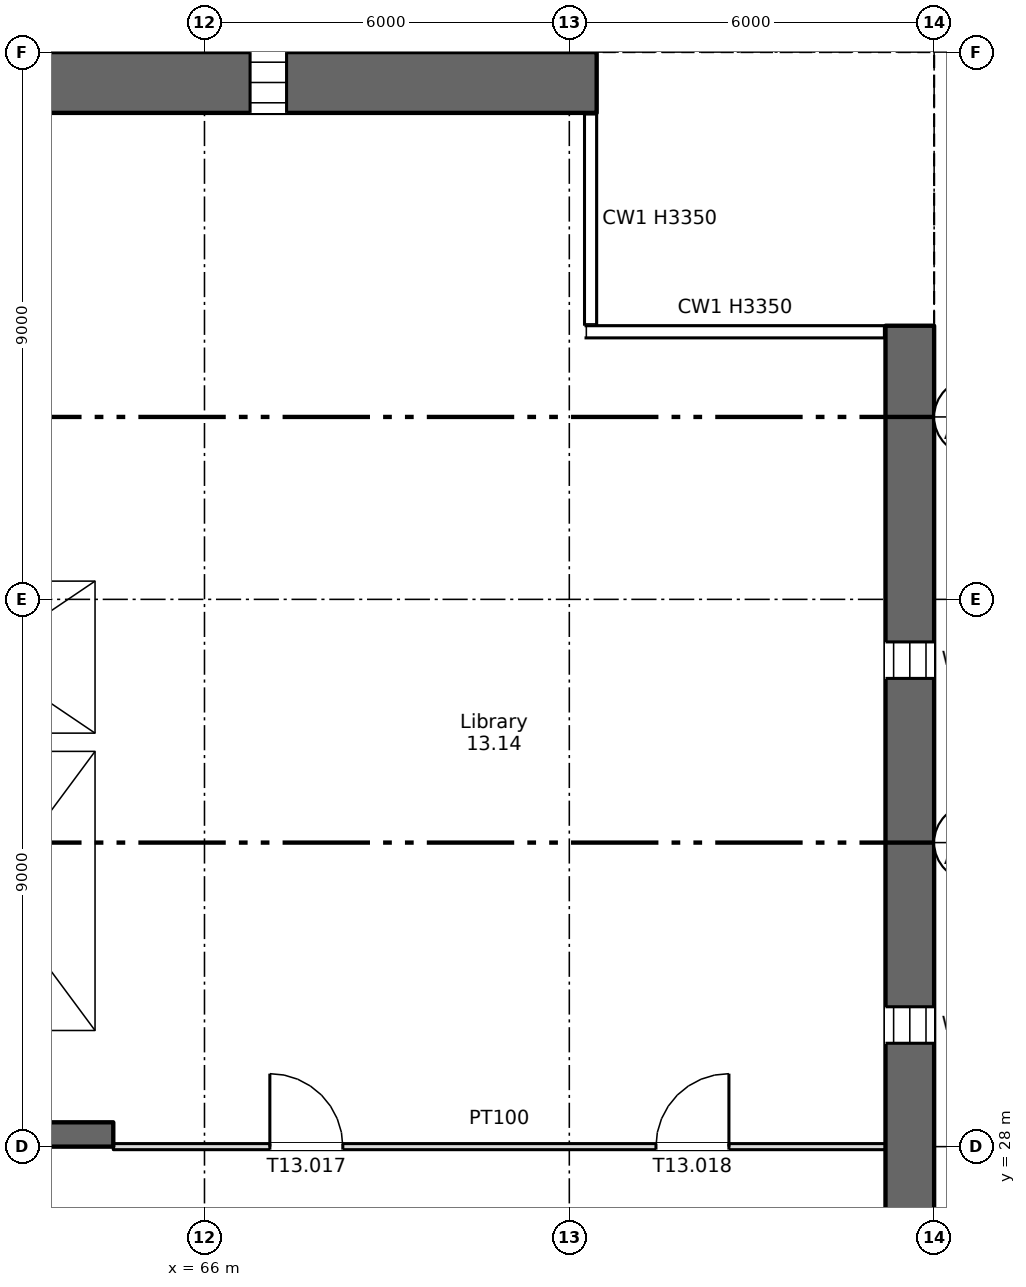
"""IFC4 building model, lengths in metres.
Left out: names, types, materials, properties, quantities, classifications, styles, units other than length and angle.
Written with IfcOpenShell. Run it as: python <this file> out.ifc"""

import sys

from ifc_helpers import new_model, si_unit, direction, frame, frame_2d, origin, place, context, subcontext, project, spatial, rectangle, extrude, element, fill, save


model = new_model("IFC4")
c1 = context("Model", 3, precision=1e-05, world=origin(), true_north=direction((0.0, 1.0)))
c2 = subcontext(c1, "Body", "Model", "MODEL_VIEW")
j1 = project(units=[si_unit("LENGTHUNIT", "METRE"), si_unit("PLANEANGLEUNIT", "RADIAN")], contexts=[c1])
p1 = place(None, origin())
s1 = spatial("IfcSite", under=j1, at=p1, CompositionType="ELEMENT")
p2 = place(p1, origin())
s2 = spatial("IfcBuilding", under=s1, at=p2, CompositionType="ELEMENT")
p3 = place(p2, frame((0.0, 0.0, 75.0)))
s3 = spatial("IfcBuildingStorey", under=s2, at=p3, CompositionType="ELEMENT", Elevation=75.0)
p4 = place(p3, frame((77.6, 4.5, 0.0), z_axis=(0.0, 0.0, 1.0), x_axis=(0.0, 1.0, 0.0)))
e1 = element("IfcWall", 1, at=p4, inside=s3, PredefinedType="SHEAR", context=c2, shape_type="SweptSolid", body=[
    extrude(rectangle(XDim=37.0, YDim=0.8, at=frame_2d((18.5, 0.0))), origin(), (0.0, 0.0, 1.0), 3.35),
])
p5 = place(p4, frame((1.2, 0.0, 0.6)))
e2 = element("IfcOpeningElement", 2, at=p5, cuts=e1, PredefinedType="OPENING", context=c2, shape_type="SweptSolid", body=[
    extrude(rectangle(XDim=0.6, YDim=2.4, at=frame_2d((0.3, 1.2))), frame((0.0, 0.41, 0.0), z_axis=(0.0, -1.0, 0.0), x_axis=(1.0, 0.0, 0.0)), (0.0, 0.0, 1.0), 0.82),
])
p6 = place(p4, frame((7.2, 0.0, 0.6)))
e3 = element("IfcOpeningElement", 3, at=p6, cuts=e1, PredefinedType="OPENING", context=c2, shape_type="SweptSolid", body=[
    extrude(rectangle(XDim=0.6, YDim=2.4, at=frame_2d((0.3, 1.2))), frame((0.0, 0.41, 0.0), z_axis=(0.0, -1.0, 0.0), x_axis=(1.0, 0.0, 0.0)), (0.0, 0.0, 1.0), 0.82),
])
p7 = place(p4, frame((13.2, 0.0, 0.6)))
e4 = element("IfcOpeningElement", 4, at=p7, cuts=e1, PredefinedType="OPENING", context=c2, shape_type="SweptSolid", body=[
    extrude(rectangle(XDim=0.6, YDim=2.4, at=frame_2d((0.3, 1.2))), frame((0.0, 0.41, 0.0), z_axis=(0.0, -1.0, 0.0), x_axis=(1.0, 0.0, 0.0)), (0.0, 0.0, 1.0), 0.82),
])
p8 = place(p4, frame((19.2, 0.0, 0.6)))
e5 = element("IfcOpeningElement", 5, at=p8, cuts=e1, PredefinedType="OPENING", context=c2, shape_type="SweptSolid", body=[
    extrude(rectangle(XDim=0.6, YDim=2.4, at=frame_2d((0.3, 1.2))), frame((0.0, 0.41, 0.0), z_axis=(0.0, -1.0, 0.0), x_axis=(1.0, 0.0, 0.0)), (0.0, 0.0, 1.0), 0.82),
])
p9 = place(p4, frame((25.2, 0.0, 0.6)))
e6 = element("IfcOpeningElement", 6, at=p9, cuts=e1, PredefinedType="OPENING", context=c2, shape_type="SweptSolid", body=[
    extrude(rectangle(XDim=0.6, YDim=2.4, at=frame_2d((0.3, 1.2))), frame((0.0, 0.41, 0.0), z_axis=(0.0, -1.0, 0.0), x_axis=(1.0, 0.0, 0.0)), (0.0, 0.0, 1.0), 0.82),
])
p10 = place(p4, frame((31.2, 0.0, 0.6)))
e7 = element("IfcOpeningElement", 7, at=p10, cuts=e1, PredefinedType="OPENING", context=c2, shape_type="SweptSolid", body=[
    extrude(rectangle(XDim=0.6, YDim=2.4, at=frame_2d((0.3, 1.2))), frame((0.0, 0.41, 0.0), z_axis=(0.0, -1.0, 0.0), x_axis=(1.0, 0.0, 0.0)), (0.0, 0.0, 1.0), 0.82),
])
p11 = place(p3, frame((5.55, 45.5, 0.0), z_axis=(0.0, 0.0, 1.0), x_axis=(1.0, 0.0, 0.0)))
e8 = element("IfcWall", 8, at=p11, inside=s3, PredefinedType="SHEAR", context=c2, shape_type="SweptSolid", body=[
    extrude(rectangle(XDim=66.9, YDim=1.0, at=frame_2d((33.45, 0.0))), origin(), (0.0, 0.0, 1.0), 3.35),
])
p12 = place(p11, frame((7.2, 0.0, 0.6)))
e9 = element("IfcOpeningElement", 9, at=p12, cuts=e8, PredefinedType="OPENING", context=c2, shape_type="SweptSolid", body=[
    extrude(rectangle(XDim=0.6, YDim=2.4, at=frame_2d((0.3, 1.2))), frame((0.0, 0.51, 0.0), z_axis=(0.0, -1.0, 0.0), x_axis=(1.0, 0.0, 0.0)), (0.0, 0.0, 1.0), 1.02),
])
p13 = place(p11, frame((61.2, 0.0, 0.6)))
e10 = element("IfcOpeningElement", 10, at=p13, cuts=e8, PredefinedType="OPENING", context=c2, shape_type="SweptSolid", body=[
    extrude(rectangle(XDim=0.6, YDim=2.4, at=frame_2d((0.3, 1.2))), frame((0.0, 0.51, 0.0), z_axis=(0.0, -1.0, 0.0), x_axis=(1.0, 0.0, 0.0)), (0.0, 0.0, 1.0), 1.02),
])
p14 = place(p3, frame((6.7, 28.2, 0.0), z_axis=(0.0, 0.0, 1.0), x_axis=(1.0, 0.0, 0.0)))
e11 = element("IfcWall", 11, at=p14, inside=s3, PredefinedType="SHEAR", context=c2, shape_type="SweptSolid", body=[
    extrude(rectangle(XDim=57.8, YDim=0.4, at=frame_2d((28.9, 0.0))), origin(), (0.0, 0.0, 1.0), 3.35),
])
p15 = place(p14, frame((12.062, 0.0, 0.0)))
e12 = element("IfcOpeningElement", 12, at=p15, cuts=e11, PredefinedType="OPENING", context=c2, shape_type="SweptSolid", body=[
    extrude(rectangle(XDim=0.9, YDim=2.1, at=frame_2d((0.45, 1.05))), frame((0.0, 0.21, 0.0), z_axis=(0.0, -1.0, 0.0), x_axis=(1.0, 0.0, 0.0)), (0.0, 0.0, 1.0), 0.42),
])
p16 = place(p14, frame((14.637, 0.0, 0.0)))
e13 = element("IfcOpeningElement", 13, at=p16, cuts=e11, PredefinedType="OPENING", context=c2, shape_type="SweptSolid", body=[
    extrude(rectangle(XDim=0.9, YDim=2.1, at=frame_2d((0.45, 1.05))), frame((0.0, 0.21, 0.0), z_axis=(0.0, -1.0, 0.0), x_axis=(1.0, 0.0, 0.0)), (0.0, 0.0, 1.0), 0.42),
])
p17 = place(p14, frame((49.062, 0.0, 0.0)))
e14 = element("IfcOpeningElement", 14, at=p17, cuts=e11, PredefinedType="OPENING", context=c2, shape_type="SweptSolid", body=[
    extrude(rectangle(XDim=0.9, YDim=2.1, at=frame_2d((0.45, 1.05))), frame((0.0, 0.21, 0.0), z_axis=(0.0, -1.0, 0.0), x_axis=(1.0, 0.0, 0.0)), (0.0, 0.0, 1.0), 0.42),
])
p18 = place(p14, frame((51.637, 0.0, 0.0)))
e15 = element("IfcOpeningElement", 15, at=p18, cuts=e11, PredefinedType="OPENING", context=c2, shape_type="SweptSolid", body=[
    extrude(rectangle(XDim=0.9, YDim=2.1, at=frame_2d((0.45, 1.05))), frame((0.0, 0.21, 0.0), z_axis=(0.0, -1.0, 0.0), x_axis=(1.0, 0.0, 0.0)), (0.0, 0.0, 1.0), 0.42),
])
p19 = place(p14, frame((1.35, 0.0, 0.0)))
e16 = element("IfcOpeningElement", 16, at=p19, cuts=e11, PredefinedType="OPENING", context=c2, shape_type="SweptSolid", body=[
    extrude(rectangle(XDim=0.9, YDim=2.1, at=frame_2d((0.45, 1.05))), frame((0.0, 0.21, 0.0), z_axis=(0.0, -1.0, 0.0), x_axis=(1.0, 0.0, 0.0)), (0.0, 0.0, 1.0), 0.42),
])
p20 = place(p14, frame((4.7, 0.0, 0.0)))
e17 = element("IfcOpeningElement", 17, at=p20, cuts=e11, PredefinedType="OPENING", context=c2, shape_type="SweptSolid", body=[
    extrude(rectangle(XDim=1.2, YDim=2.1, at=frame_2d((0.6, 1.05))), frame((0.0, 0.21, 0.0), z_axis=(0.0, -1.0, 0.0), x_axis=(1.0, 0.0, 0.0)), (0.0, 0.0, 1.0), 0.42),
])
p21 = place(p14, frame((31.7, 0.0, 0.0)))
e18 = element("IfcOpeningElement", 18, at=p21, cuts=e11, PredefinedType="OPENING", context=c2, shape_type="SweptSolid", body=[
    extrude(rectangle(XDim=1.2, YDim=2.1, at=frame_2d((0.6, 1.05))), frame((0.0, 0.21, 0.0), z_axis=(0.0, -1.0, 0.0), x_axis=(1.0, 0.0, 0.0)), (0.0, 0.0, 1.0), 0.42),
])
p22 = place(p14, frame((55.2, 0.0, 0.0)))
e19 = element("IfcOpeningElement", 19, at=p22, cuts=e11, PredefinedType="OPENING", context=c2, shape_type="SweptSolid", body=[
    extrude(rectangle(XDim=1.2, YDim=2.1, at=frame_2d((0.6, 1.05))), frame((0.0, 0.21, 0.0), z_axis=(0.0, -1.0, 0.0), x_axis=(1.0, 0.0, 0.0)), (0.0, 0.0, 1.0), 0.42),
])
p23 = place(p14, frame((21.7, 0.0, 0.0)))
e20 = element("IfcOpeningElement", 20, at=p23, cuts=e11, PredefinedType="OPENING", context=c2, shape_type="SweptSolid", body=[
    extrude(rectangle(XDim=1.2, YDim=2.1, at=frame_2d((0.6, 1.05))), frame((0.0, 0.21, 0.0), z_axis=(0.0, -1.0, 0.0), x_axis=(1.0, 0.0, 0.0)), (0.0, 0.0, 1.0), 0.42),
])
p24 = place(p14, frame((41.7, 0.0, 0.0)))
e21 = element("IfcOpeningElement", 21, at=p24, cuts=e11, PredefinedType="OPENING", context=c2, shape_type="SweptSolid", body=[
    extrude(rectangle(XDim=1.2, YDim=2.1, at=frame_2d((0.6, 1.05))), frame((0.0, 0.21, 0.0), z_axis=(0.0, -1.0, 0.0), x_axis=(1.0, 0.0, 0.0)), (0.0, 0.0, 1.0), 0.42),
])
p25 = place(p14, frame((24.85, 0.0, 0.0)))
e22 = element("IfcOpeningElement", 22, at=p25, cuts=e11, PredefinedType="OPENING", context=c2, shape_type="SweptSolid", body=[
    extrude(rectangle(XDim=2.4, YDim=2.1, at=frame_2d((1.2, 1.05))), frame((0.0, 0.21, 0.0), z_axis=(0.0, -1.0, 0.0), x_axis=(1.0, 0.0, 0.0)), (0.0, 0.0, 1.0), 0.42),
])
p26 = place(p14, frame((37.35, 0.0, 0.0)))
e23 = element("IfcOpeningElement", 23, at=p26, cuts=e11, PredefinedType="OPENING", context=c2, shape_type="SweptSolid", body=[
    extrude(rectangle(XDim=2.4, YDim=2.1, at=frame_2d((1.2, 1.05))), frame((0.0, 0.21, 0.0), z_axis=(0.0, -1.0, 0.0), x_axis=(1.0, 0.0, 0.0)), (0.0, 0.0, 1.0), 0.42),
])
p27 = place(p14, frame((7.85, 0.0, 0.0)))
e24 = element("IfcOpeningElement", 24, at=p27, cuts=e11, PredefinedType="OPENING", context=c2, shape_type="SweptSolid", body=[
    extrude(rectangle(XDim=2.4, YDim=2.1, at=frame_2d((1.2, 1.05))), frame((0.0, 0.21, 0.0), z_axis=(0.0, -1.0, 0.0), x_axis=(1.0, 0.0, 0.0)), (0.0, 0.0, 1.0), 0.42),
])
p28 = place(p14, frame((28.85, 0.0, 0.0)))
e25 = element("IfcOpeningElement", 25, at=p28, cuts=e11, PredefinedType="OPENING", context=c2, shape_type="SweptSolid", body=[
    extrude(rectangle(XDim=0.9, YDim=2.1, at=frame_2d((0.45, 1.05))), frame((0.0, 0.21, 0.0), z_axis=(0.0, -1.0, 0.0), x_axis=(1.0, 0.0, 0.0)), (0.0, 0.0, 1.0), 0.42),
])
p29 = place(p14, frame((34.85, 0.0, 0.0)))
e26 = element("IfcOpeningElement", 26, at=p29, cuts=e11, PredefinedType="OPENING", context=c2, shape_type="SweptSolid", body=[
    extrude(rectangle(XDim=0.9, YDim=2.1, at=frame_2d((0.45, 1.05))), frame((0.0, 0.21, 0.0), z_axis=(0.0, -1.0, 0.0), x_axis=(1.0, 0.0, 0.0)), (0.0, 0.0, 1.0), 0.42),
])
p30 = place(p3, frame((64.35, 34.8, 0.0), z_axis=(0.0, 0.0, 1.0), x_axis=(0.0, 1.0, 0.0)))
e27 = element("IfcWall", 27, at=p30, inside=s3, PredefinedType="SHEAR", context=c2, shape_type="SweptSolid", body=[
    extrude(rectangle(XDim=10.2, YDim=0.3, at=frame_2d((5.1, 0.0))), origin(), (0.0, 0.0, 1.0), 3.35),
])
p31 = place(p3, frame((64.35, 28.4, 0.0), z_axis=(0.0, 0.0, 1.0), x_axis=(0.0, 1.0, 0.0)))
e28 = element("IfcWall", 28, at=p31, inside=s3, PredefinedType="SHEAR", context=c2, shape_type="SweptSolid", body=[
    extrude(rectangle(XDim=6.1, YDim=0.3, at=frame_2d((3.05, 0.0))), origin(), (0.0, 0.0, 1.0), 3.35),
])
p32 = place(p3, frame((60.5, 34.65, 0.0), z_axis=(0.0, 0.0, 1.0), x_axis=(1.0, 0.0, 0.0)))
e29 = element("IfcWall", 29, at=p32, inside=s3, PredefinedType="SHEAR", context=c2, shape_type="SweptSolid", body=[
    extrude(rectangle(XDim=4.0, YDim=0.3, at=frame_2d((2.0, 0.0))), origin(), (0.0, 0.0, 1.0), 3.35),
])
p33 = place(p3, frame((60.5, 37.45, 0.0), z_axis=(0.0, 0.0, 1.0), x_axis=(1.0, 0.0, 0.0)))
e30 = element("IfcWall", 30, at=p33, inside=s3, PredefinedType="SHEAR", context=c2, shape_type="SweptSolid", body=[
    extrude(rectangle(XDim=3.7, YDim=0.3, at=frame_2d((1.85, 0.0))), origin(), (0.0, 0.0, 1.0), 3.35),
])
p34 = place(p33, frame((1.3, 0.0, 0.0)))
e31 = element("IfcOpeningElement", 31, at=p34, cuts=e30, PredefinedType="OPENING", context=c2, shape_type="SweptSolid", body=[
    extrude(rectangle(XDim=1.1, YDim=2.1, at=frame_2d((0.55, 1.05))), frame((0.0, 0.16, 0.0), z_axis=(0.0, -1.0, 0.0), x_axis=(1.0, 0.0, 0.0)), (0.0, 0.0, 1.0), 0.32),
])
p35 = place(p3, frame((64.5, 28.0, 0.0), z_axis=(0.0, 0.0, 1.0), x_axis=(1.0, 0.0, 0.0)))
e32 = element("IfcWall", 32, at=p35, inside=s3, PredefinedType="PARTITIONING", context=c2, shape_type="SweptSolid", body=[
    extrude(rectangle(XDim=12.7, YDim=0.1, at=frame_2d((6.35, 0.0))), origin(), (0.0, 0.0, 1.0), 3.35),
])
p36 = place(p35, frame((2.575, 0.0, 0.0)))
e33 = element("IfcOpeningElement", 33, at=p36, cuts=e32, PredefinedType="OPENING", context=c2, shape_type="SweptSolid", body=[
    extrude(rectangle(XDim=1.2, YDim=2.1, at=frame_2d((0.6, 1.05))), frame((0.0, 0.06, 0.0), z_axis=(0.0, -1.0, 0.0), x_axis=(1.0, 0.0, 0.0)), (0.0, 0.0, 1.0), 0.12),
])
p37 = place(p35, frame((8.925, 0.0, 0.0)))
e34 = element("IfcOpeningElement", 34, at=p37, cuts=e32, PredefinedType="OPENING", context=c2, shape_type="SweptSolid", body=[
    extrude(rectangle(XDim=1.2, YDim=2.1, at=frame_2d((0.6, 1.05))), frame((0.0, 0.06, 0.0), z_axis=(0.0, -1.0, 0.0), x_axis=(1.0, 0.0, 0.0)), (0.0, 0.0, 1.0), 0.12),
])
p38 = place(p13, origin())
e35 = element("IfcWindow", 35, at=p38, inside=s3, PartitioningType="SINGLE_PANEL", PredefinedType="WINDOW", context=c2, shape_type="SweptSolid", body=[
    extrude(rectangle(XDim=0.6, YDim=2.4, at=frame_2d((0.3, 1.2))), frame((0.0, 0.03, 0.0), z_axis=(0.0, -1.0, 0.0), x_axis=(1.0, 0.0, 0.0)), (0.0, 0.0, 1.0), 0.06),
])
fill(e10, e35)
p39 = place(p9, origin())
e36 = element("IfcWindow", 36, at=p39, inside=s3, PartitioningType="SINGLE_PANEL", PredefinedType="WINDOW", context=c2, shape_type="SweptSolid", body=[
    extrude(rectangle(XDim=0.6, YDim=2.4, at=frame_2d((0.3, 1.2))), frame((0.0, 0.03, 0.0), z_axis=(0.0, -1.0, 0.0), x_axis=(1.0, 0.0, 0.0)), (0.0, 0.0, 1.0), 0.06),
])
fill(e6, e36)
p40 = place(p10, origin())
e37 = element("IfcWindow", 37, at=p40, inside=s3, PartitioningType="SINGLE_PANEL", PredefinedType="WINDOW", context=c2, shape_type="SweptSolid", body=[
    extrude(rectangle(XDim=0.6, YDim=2.4, at=frame_2d((0.3, 1.2))), frame((0.0, 0.03, 0.0), z_axis=(0.0, -1.0, 0.0), x_axis=(1.0, 0.0, 0.0)), (0.0, 0.0, 1.0), 0.06),
])
fill(e7, e37)
p41 = place(p36, origin())
e38 = element("IfcDoor", 38, at=p41, inside=s3, OperationType="SINGLE_SWING_LEFT", PredefinedType="DOOR", context=c2, shape_type="SweptSolid", body=[
    extrude(rectangle(XDim=1.2, YDim=2.1, at=frame_2d((0.6, 1.05))), frame((0.0, 0.025, 0.0), z_axis=(0.0, -1.0, 0.0), x_axis=(1.0, 0.0, 0.0)), (0.0, 0.0, 1.0), 0.05),
])
fill(e33, e38)
p42 = place(p37, origin())
e39 = element("IfcDoor", 39, at=p42, inside=s3, OperationType="SINGLE_SWING_RIGHT", PredefinedType="DOOR", context=c2, shape_type="SweptSolid", body=[
    extrude(rectangle(XDim=1.2, YDim=2.1, at=frame_2d((0.6, 1.05))), frame((0.0, 0.025, 0.0), z_axis=(0.0, -1.0, 0.0), x_axis=(1.0, 0.0, 0.0)), (0.0, 0.0, 1.0), 0.05),
])
fill(e34, e39)
save(model, sys.argv[1])
